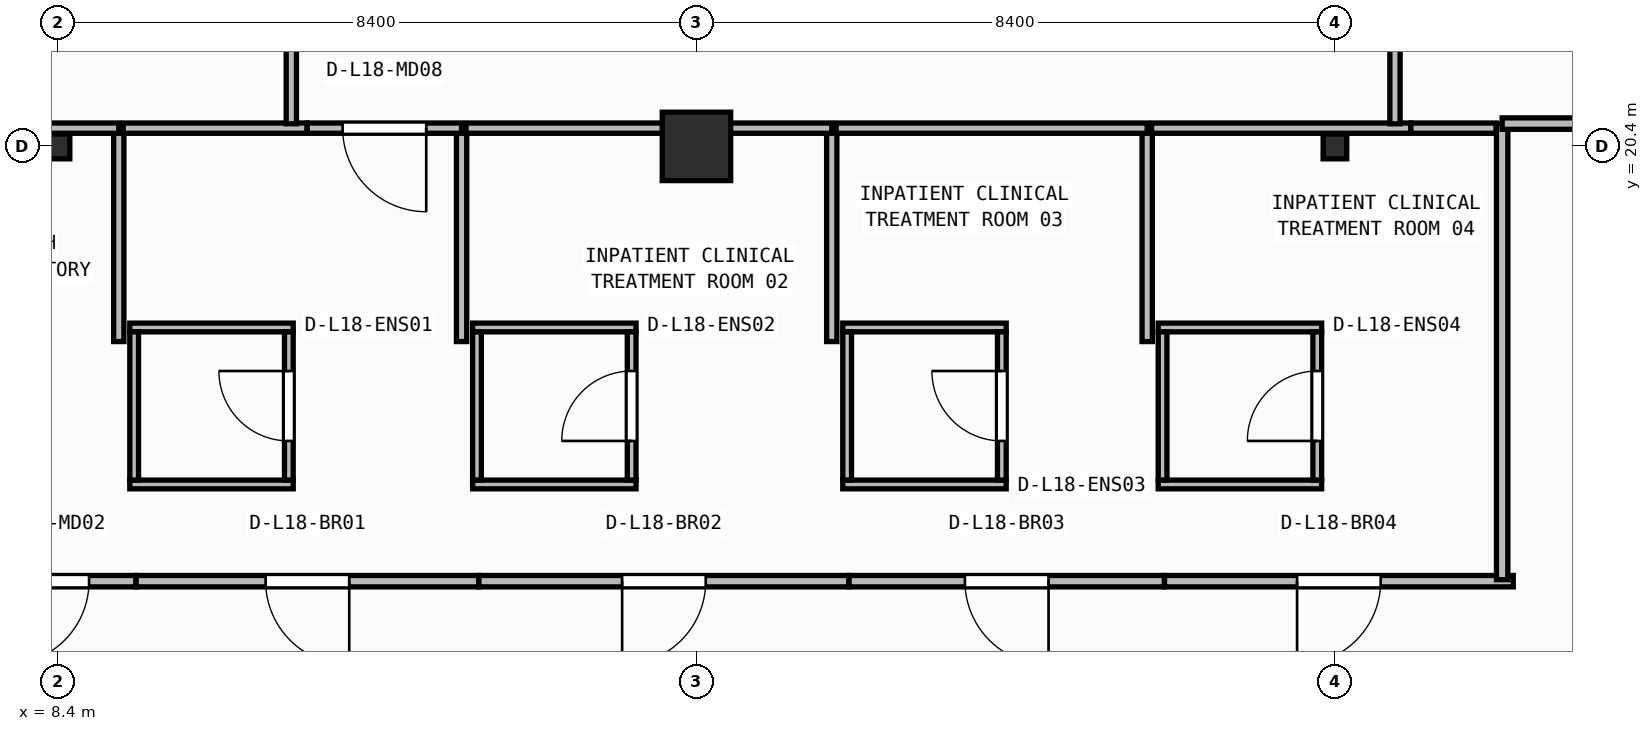
"""IFC4 building model, lengths in metres.
Left out: names, types, materials, properties, quantities, classifications, styles, units other than length and angle.
Written with IfcOpenShell. Run it as: python <this file> out.ifc"""

import sys

from ifc_helpers import new_model, si_unit, direction, frame, frame_2d, origin, origin_2d, place, context, subcontext, project, spatial, rectangle, i_section, extrude, element, fill, save


model = new_model("IFC4")
c1 = context("Model", 3, precision=1e-05, world=origin(), true_north=direction((0.0, 1.0)))
c2 = subcontext(c1, "Body", "Model", "MODEL_VIEW")
j1 = project(units=[si_unit("LENGTHUNIT", "METRE"), si_unit("PLANEANGLEUNIT", "RADIAN")], contexts=[c1])
p1 = place(None, origin())
s1 = spatial("IfcSite", under=j1, at=p1, CompositionType="ELEMENT")
p2 = place(p1, origin())
s2 = spatial("IfcBuilding", under=s1, at=p2, CompositionType="ELEMENT")
p3 = place(p2, frame((0.0, 0.0, 73.85)))
s3 = spatial("IfcBuildingStorey", under=s2, at=p3, CompositionType="ELEMENT", Elevation=73.85)
p4 = place(p3, frame((8.4, 20.4, 0.0), z_axis=(0.0, 0.0, 1.0), x_axis=(1.0, 0.0, 0.0)))
e1 = element("IfcColumn", 1, at=p4, inside=s3, PredefinedType="COLUMN", context=c2, shape_type="SweptSolid", body=[
    extrude(i_section(OverallWidth=0.311, OverallDepth=0.327, WebThickness=0.016, FlangeThickness=0.025, FilletRadius=0.017, at=origin_2d()), origin(), (0.0, 0.0, 1.0), 3.95),
])
p5 = place(p3, frame((16.8, 20.4, 0.0), z_axis=(0.0, 0.0, 1.0), x_axis=(1.0, 0.0, 0.0)))
e2 = element("IfcColumn", 2, at=p5, inside=s3, PredefinedType="COLUMN", context=c2, shape_type="SweptSolid", body=[
    extrude(rectangle(XDim=0.9, YDim=0.9, at=origin_2d()), origin(), (0.0, 0.0, 1.0), 3.95),
])
p6 = place(p3, frame((25.2, 20.4, 0.0), z_axis=(0.0, 0.0, 1.0), x_axis=(1.0, 0.0, 0.0)))
e3 = element("IfcColumn", 3, at=p6, inside=s3, PredefinedType="COLUMN", context=c2, shape_type="SweptSolid", body=[
    extrude(i_section(OverallWidth=0.311, OverallDepth=0.327, WebThickness=0.016, FlangeThickness=0.025, FilletRadius=0.017, at=origin_2d()), origin(), (0.0, 0.0, 1.0), 3.95),
])
for number, where, z_axis, x_axis in (
    (4, (9.345, 15.952, 0.0), (0.0, 0.0, 1.0), (1.0, 0.0, 0.0)),
    (5, (9.345, 18.018, 0.0), (0.0, 0.0, 1.0), (1.0, 0.0, 0.0)),
):
    element("IfcWall", number, at=place(p3, frame(where, z_axis=z_axis, x_axis=x_axis)), inside=s3, PredefinedType="PARTITIONING", context=c2, shape_type="SweptSolid", body=[
        extrude(rectangle(XDim=2.15, YDim=0.115, at=frame_2d((1.075, 0.0))), origin(), (0.0, 0.0, 1.0), 3.71),
    ])
p7 = place(p3, frame((9.403, 16.01, 0.0), z_axis=(0.0, 0.0, 1.0), x_axis=(0.0, 1.0, 0.0)))
e6 = element("IfcWall", 6, at=p7, inside=s3, PredefinedType="PARTITIONING", context=c2, shape_type="SweptSolid", body=[
    extrude(rectangle(XDim=1.95, YDim=0.115, at=frame_2d((0.975, 0.0))), origin(), (0.0, 0.0, 1.0), 3.71),
])
p8 = place(p3, frame((11.438, 16.01, 0.0), z_axis=(0.0, 0.0, 1.0), x_axis=(0.0, 1.0, 0.0)))
e7 = element("IfcWall", 7, at=p8, inside=s3, PredefinedType="PARTITIONING", context=c2, shape_type="SweptSolid", body=[
    extrude(rectangle(XDim=1.95, YDim=0.115, at=frame_2d((0.975, 0.0))), origin(), (0.0, 0.0, 1.0), 3.71),
])
p9 = place(p8, frame((0.515, 0.0, 0.0)))
e8 = element("IfcOpeningElement", 8, at=p9, cuts=e7, PredefinedType="OPENING", context=c2, shape_type="SweptSolid", body=[
    extrude(rectangle(XDim=0.92, YDim=2.1, at=frame_2d((0.46, 1.05))), frame((0.0, 0.067, 0.0), z_axis=(0.0, -1.0, 0.0), x_axis=(1.0, 0.0, 0.0)), (0.0, 0.0, 1.0), 0.135),
])
for number, where, z_axis, x_axis in (
    (9, (13.855, 15.952, 0.0), (0.0, 0.0, 1.0), (1.0, 0.0, 0.0)),
    (10, (13.855, 18.018, 0.0), (0.0, 0.0, 1.0), (1.0, 0.0, 0.0)),
):
    element("IfcWall", number, at=place(p3, frame(where, z_axis=z_axis, x_axis=x_axis)), inside=s3, PredefinedType="PARTITIONING", context=c2, shape_type="SweptSolid", body=[
        extrude(rectangle(XDim=2.15, YDim=0.115, at=frame_2d((1.075, 0.0))), origin(), (0.0, 0.0, 1.0), 3.71),
    ])
p10 = place(p3, frame((13.913, 16.01, 0.0), z_axis=(0.0, 0.0, 1.0), x_axis=(0.0, 1.0, 0.0)))
e11 = element("IfcWall", 11, at=p10, inside=s3, PredefinedType="PARTITIONING", context=c2, shape_type="SweptSolid", body=[
    extrude(rectangle(XDim=1.95, YDim=0.115, at=frame_2d((0.975, 0.0))), origin(), (0.0, 0.0, 1.0), 3.71),
])
p11 = place(p3, frame((15.948, 16.01, 0.0), z_axis=(0.0, 0.0, 1.0), x_axis=(0.0, 1.0, 0.0)))
e12 = element("IfcWall", 12, at=p11, inside=s3, PredefinedType="PARTITIONING", context=c2, shape_type="SweptSolid", body=[
    extrude(rectangle(XDim=1.95, YDim=0.115, at=frame_2d((0.975, 0.0))), origin(), (0.0, 0.0, 1.0), 3.71),
])
p12 = place(p11, frame((0.515, 0.0, 0.0)))
e13 = element("IfcOpeningElement", 13, at=p12, cuts=e12, PredefinedType="OPENING", context=c2, shape_type="SweptSolid", body=[
    extrude(rectangle(XDim=0.92, YDim=2.1, at=frame_2d((0.46, 1.05))), frame((0.0, 0.067, 0.0), z_axis=(0.0, -1.0, 0.0), x_axis=(1.0, 0.0, 0.0)), (0.0, 0.0, 1.0), 0.135),
])
for number, where, z_axis, x_axis in (
    (14, (18.725, 15.952, 0.0), (0.0, 0.0, 1.0), (1.0, 0.0, 0.0)),
    (15, (18.725, 18.018, 0.0), (0.0, 0.0, 1.0), (1.0, 0.0, 0.0)),
):
    element("IfcWall", number, at=place(p3, frame(where, z_axis=z_axis, x_axis=x_axis)), inside=s3, PredefinedType="PARTITIONING", context=c2, shape_type="SweptSolid", body=[
        extrude(rectangle(XDim=2.15, YDim=0.115, at=frame_2d((1.075, 0.0))), origin(), (0.0, 0.0, 1.0), 3.71),
    ])
p13 = place(p3, frame((18.782, 16.01, 0.0), z_axis=(0.0, 0.0, 1.0), x_axis=(0.0, 1.0, 0.0)))
e16 = element("IfcWall", 16, at=p13, inside=s3, PredefinedType="PARTITIONING", context=c2, shape_type="SweptSolid", body=[
    extrude(rectangle(XDim=1.95, YDim=0.115, at=frame_2d((0.975, 0.0))), origin(), (0.0, 0.0, 1.0), 3.71),
])
p14 = place(p3, frame((20.817, 16.01, 0.0), z_axis=(0.0, 0.0, 1.0), x_axis=(0.0, 1.0, 0.0)))
e17 = element("IfcWall", 17, at=p14, inside=s3, PredefinedType="PARTITIONING", context=c2, shape_type="SweptSolid", body=[
    extrude(rectangle(XDim=1.95, YDim=0.115, at=frame_2d((0.975, 0.0))), origin(), (0.0, 0.0, 1.0), 3.71),
])
p15 = place(p14, frame((0.515, 0.0, 0.0)))
e18 = element("IfcOpeningElement", 18, at=p15, cuts=e17, PredefinedType="OPENING", context=c2, shape_type="SweptSolid", body=[
    extrude(rectangle(XDim=0.92, YDim=2.1, at=frame_2d((0.46, 1.05))), frame((0.0, 0.067, 0.0), z_axis=(0.0, -1.0, 0.0), x_axis=(1.0, 0.0, 0.0)), (0.0, 0.0, 1.0), 0.135),
])
for number, where, z_axis, x_axis in (
    (19, (22.875, 15.952, 0.0), (0.0, 0.0, 1.0), (1.0, 0.0, 0.0)),
    (20, (22.875, 18.018, 0.0), (0.0, 0.0, 1.0), (1.0, 0.0, 0.0)),
):
    element("IfcWall", number, at=place(p3, frame(where, z_axis=z_axis, x_axis=x_axis)), inside=s3, PredefinedType="PARTITIONING", context=c2, shape_type="SweptSolid", body=[
        extrude(rectangle(XDim=2.15, YDim=0.115, at=frame_2d((1.075, 0.0))), origin(), (0.0, 0.0, 1.0), 3.71),
    ])
p16 = place(p3, frame((22.933, 16.01, 0.0), z_axis=(0.0, 0.0, 1.0), x_axis=(0.0, 1.0, 0.0)))
e21 = element("IfcWall", 21, at=p16, inside=s3, PredefinedType="PARTITIONING", context=c2, shape_type="SweptSolid", body=[
    extrude(rectangle(XDim=1.95, YDim=0.115, at=frame_2d((0.975, 0.0))), origin(), (0.0, 0.0, 1.0), 3.71),
])
p17 = place(p3, frame((24.968, 16.01, 0.0), z_axis=(0.0, 0.0, 1.0), x_axis=(0.0, 1.0, 0.0)))
e22 = element("IfcWall", 22, at=p17, inside=s3, PredefinedType="PARTITIONING", context=c2, shape_type="SweptSolid", body=[
    extrude(rectangle(XDim=1.95, YDim=0.115, at=frame_2d((0.975, 0.0))), origin(), (0.0, 0.0, 1.0), 3.073),
])
p18 = place(p17, frame((0.515, 0.0, 0.0)))
e23 = element("IfcOpeningElement", 23, at=p18, cuts=e22, PredefinedType="OPENING", context=c2, shape_type="SweptSolid", body=[
    extrude(rectangle(XDim=0.92, YDim=2.1, at=frame_2d((0.46, 1.05))), frame((0.0, 0.067, 0.0), z_axis=(0.0, -1.0, 0.0), x_axis=(1.0, 0.0, 0.0)), (0.0, 0.0, 1.0), 0.135),
])
p19 = place(p3, frame((9.426, 14.68, 0.0), z_axis=(0.0, 0.0, 1.0), x_axis=(-1.0, 0.0, 0.0)))
e24 = element("IfcWall", 24, at=p19, inside=s3, PredefinedType="PARTITIONING", context=c2, shape_type="SweptSolid", body=[
    extrude(rectangle(XDim=2.334, YDim=0.15, at=frame_2d((1.167, 0.0))), origin(), (0.0, 0.0, 1.0), 3.71),
])
p20 = place(p19, frame((0.617, 0.0, 0.0)))
e25 = element("IfcOpeningElement", 25, at=p20, cuts=e24, PredefinedType="OPENING", context=c2, shape_type="SweptSolid", body=[
    extrude(rectangle(XDim=1.1, YDim=2.1, at=frame_2d((0.55, 1.05))), frame((0.0, 0.085, 0.0), z_axis=(0.0, -1.0, 0.0), x_axis=(1.0, 0.0, 0.0)), (0.0, 0.0, 1.0), 0.17),
])
p21 = place(p3, frame((13.936, 14.68, 0.0), z_axis=(0.0, 0.0, 1.0), x_axis=(-1.0, 0.0, 0.0)))
e26 = element("IfcWall", 26, at=p21, inside=s3, PredefinedType="PARTITIONING", context=c2, shape_type="SweptSolid", body=[
    extrude(rectangle(XDim=4.508, YDim=0.15, at=frame_2d((2.254, 0.0))), origin(), (0.0, 0.0, 1.0), 3.71),
])
p22 = place(p21, frame((1.704, 0.0, 0.0)))
e27 = element("IfcOpeningElement", 27, at=p22, cuts=e26, PredefinedType="OPENING", context=c2, shape_type="SweptSolid", body=[
    extrude(rectangle(XDim=1.1, YDim=2.1, at=frame_2d((0.55, 1.05))), frame((0.0, 0.085, 0.0), z_axis=(0.0, -1.0, 0.0), x_axis=(1.0, 0.0, 0.0)), (0.0, 0.0, 1.0), 0.17),
])
p23 = place(p3, frame((18.806, 14.68, 0.0), z_axis=(0.0, 0.0, 1.0), x_axis=(-1.0, 0.0, 0.0)))
e28 = element("IfcWall", 28, at=p23, inside=s3, PredefinedType="PARTITIONING", context=c2, shape_type="SweptSolid", body=[
    extrude(rectangle(XDim=4.868, YDim=0.15, at=frame_2d((2.434, 0.0))), origin(), (0.0, 0.0, 1.0), 3.71),
])
p24 = place(p23, frame((1.884, 0.0, 0.0)))
e29 = element("IfcOpeningElement", 29, at=p24, cuts=e28, PredefinedType="OPENING", context=c2, shape_type="SweptSolid", body=[
    extrude(rectangle(XDim=1.1, YDim=2.1, at=frame_2d((0.55, 1.05))), frame((0.0, 0.085, 0.0), z_axis=(0.0, -1.0, 0.0), x_axis=(1.0, 0.0, 0.0)), (0.0, 0.0, 1.0), 0.17),
])
p25 = place(p3, frame((22.956, 14.68, 0.0), z_axis=(0.0, 0.0, 1.0), x_axis=(-1.0, 0.0, 0.0)))
e30 = element("IfcWall", 30, at=p25, inside=s3, PredefinedType="PARTITIONING", context=c2, shape_type="SweptSolid", body=[
    extrude(rectangle(XDim=4.148, YDim=0.15, at=frame_2d((2.074, 0.0))), origin(), (0.0, 0.0, 1.0), 3.71),
])
p26 = place(p25, frame((1.524, 0.0, 0.0)))
e31 = element("IfcOpeningElement", 31, at=p26, cuts=e30, PredefinedType="OPENING", context=c2, shape_type="SweptSolid", body=[
    extrude(rectangle(XDim=1.1, YDim=2.1, at=frame_2d((0.55, 1.05))), frame((0.0, 0.085, 0.0), z_axis=(0.0, -1.0, 0.0), x_axis=(1.0, 0.0, 0.0)), (0.0, 0.0, 1.0), 0.17),
])
p27 = place(p3, frame((27.546, 14.68, 0.0), z_axis=(0.0, 0.0, 1.0), x_axis=(-1.0, 0.0, 0.0)))
e32 = element("IfcWall", 32, at=p27, inside=s3, PredefinedType="PARTITIONING", context=c2, shape_type="SweptSolid", body=[
    extrude(rectangle(XDim=4.588, YDim=0.15, at=frame_2d((2.294, 0.0))), origin(), (0.0, 0.0, 1.0), 3.71),
])
p28 = place(p27, frame((1.744, 0.0, 0.0)))
e33 = element("IfcOpeningElement", 33, at=p28, cuts=e32, PredefinedType="OPENING", context=c2, shape_type="SweptSolid", body=[
    extrude(rectangle(XDim=1.1, YDim=2.1, at=frame_2d((0.55, 1.05))), frame((0.0, 0.085, 0.0), z_axis=(0.0, -1.0, 0.0), x_axis=(1.0, 0.0, 0.0)), (0.0, 0.0, 1.0), 0.17),
])
p29 = place(p3, frame((27.4, 20.7, 0.0), z_axis=(0.0, 0.0, 1.0), x_axis=(0.0, -1.0, 0.0)))
e34 = element("IfcWall", 34, at=p29, inside=s3, PredefinedType="PARTITIONING", context=c2, shape_type="SweptSolid", body=[
    extrude(rectangle(XDim=6.0, YDim=0.15, at=frame_2d((3.0, 0.0))), origin(), (0.0, 0.0, 1.0), 3.71),
])
p30 = place(p3, frame((29.9, 20.7, 0.0), z_axis=(0.0, 0.0, 1.0), x_axis=(-1.0, 0.0, 0.0)))
e35 = element("IfcWall", 35, at=p30, inside=s3, PredefinedType="PARTITIONING", context=c2, shape_type="SweptSolid", body=[
    extrude(rectangle(XDim=2.5, YDim=0.15, at=frame_2d((1.25, 0.0))), origin(), (0.0, 0.0, 1.0), 3.073),
])
p31 = place(p30, frame((0.225, 0.0, 0.0)))
e36 = element("IfcOpeningElement", 36, at=p31, cuts=e35, PredefinedType="OPENING", context=c2, shape_type="SweptSolid", body=[
    extrude(rectangle(XDim=1.1, YDim=2.1, at=frame_2d((0.55, 1.05))), frame((0.0, 0.085, 0.0), z_axis=(0.0, -1.0, 0.0), x_axis=(1.0, 0.0, 0.0)), (0.0, 0.0, 1.0), 0.17),
])
p32 = place(p3, frame((9.2, 17.833, 0.0), z_axis=(0.0, 0.0, 1.0), x_axis=(0.0, 1.0, 0.0)))
e37 = element("IfcWall", 37, at=p32, inside=s3, PredefinedType="PARTITIONING", context=c2, shape_type="SweptSolid", body=[
    extrude(rectangle(XDim=2.807, YDim=0.135, at=frame_2d((1.404, 0.0))), origin(), (0.0, 0.0, 1.0), 3.71),
])
p33 = place(p3, frame((9.2, 20.64, 0.0), z_axis=(0.0, 0.0, 1.0), x_axis=(-1.0, 0.0, 0.0)))
e38 = element("IfcWall", 38, at=p33, inside=s3, PredefinedType="PARTITIONING", context=c2, shape_type="SweptSolid", body=[
    extrude(rectangle(XDim=4.093, YDim=0.135, at=frame_2d((2.046, 0.0))), origin(), (0.0, 0.0, 1.0), 3.073),
])
p34 = place(p3, frame((13.71, 17.833, 0.0), z_axis=(0.0, 0.0, 1.0), x_axis=(0.0, 1.0, 0.0)))
e39 = element("IfcWall", 39, at=p34, inside=s3, PredefinedType="PARTITIONING", context=c2, shape_type="SweptSolid", body=[
    extrude(rectangle(XDim=2.807, YDim=0.135, at=frame_2d((1.404, 0.0))), origin(), (0.0, 0.0, 1.0), 3.71),
])
p35 = place(p3, frame((11.677, 20.64, 0.0), z_axis=(0.0, 0.0, 1.0), x_axis=(-1.0, 0.0, 0.0)))
e40 = element("IfcWall", 40, at=p35, inside=s3, PredefinedType="PARTITIONING", context=c2, shape_type="SweptSolid", body=[
    extrude(rectangle(XDim=2.42, YDim=0.135, at=frame_2d((1.21, 0.0))), origin(), (0.0, 0.0, 1.0), 3.073),
])
p36 = place(p3, frame((13.71, 20.64, 0.0), z_axis=(0.0, 0.0, 1.0), x_axis=(-1.0, 0.0, 0.0)))
e41 = element("IfcWall", 41, at=p36, inside=s3, PredefinedType="PARTITIONING", context=c2, shape_type="SweptSolid", body=[
    extrude(rectangle(XDim=2.031, YDim=0.135, at=frame_2d((1.015, 0.0))), origin(), (0.0, 0.0, 1.0), 3.073),
])
p37 = place(p36, frame((0.465, 0.0, 0.0)))
e42 = element("IfcOpeningElement", 42, at=p37, cuts=e41, PredefinedType="OPENING", context=c2, shape_type="SweptSolid", body=[
    extrude(rectangle(XDim=1.1, YDim=2.1, at=frame_2d((0.55, 1.05))), frame((0.0, 0.077, 0.0), z_axis=(0.0, -1.0, 0.0), x_axis=(1.0, 0.0, 0.0)), (0.0, 0.0, 1.0), 0.155),
])
p38 = place(p3, frame((18.58, 17.833, 0.0), z_axis=(0.0, 0.0, 1.0), x_axis=(0.0, 1.0, 0.0)))
e43 = element("IfcWall", 43, at=p38, inside=s3, PredefinedType="PARTITIONING", context=c2, shape_type="SweptSolid", body=[
    extrude(rectangle(XDim=2.807, YDim=0.135, at=frame_2d((1.404, 0.0))), origin(), (0.0, 0.0, 1.0), 3.71),
])
p39 = place(p3, frame((18.58, 20.64, 0.0), z_axis=(0.0, 0.0, 1.0), x_axis=(-1.0, 0.0, 0.0)))
e44 = element("IfcWall", 44, at=p39, inside=s3, PredefinedType="PARTITIONING", context=c2, shape_type="SweptSolid", body=[
    extrude(rectangle(XDim=4.812, YDim=0.135, at=frame_2d((2.406, 0.0))), origin(), (0.0, 0.0, 1.0), 3.073),
])
p40 = place(p3, frame((22.73, 17.833, 0.0), z_axis=(0.0, 0.0, 1.0), x_axis=(0.0, 1.0, 0.0)))
e45 = element("IfcWall", 45, at=p40, inside=s3, PredefinedType="PARTITIONING", context=c2, shape_type="SweptSolid", body=[
    extrude(rectangle(XDim=2.807, YDim=0.135, at=frame_2d((1.404, 0.0))), origin(), (0.0, 0.0, 1.0), 3.71),
])
p41 = place(p3, frame((22.73, 20.64, 0.0), z_axis=(0.0, 0.0, 1.0), x_axis=(-1.0, 0.0, 0.0)))
e46 = element("IfcWall", 46, at=p41, inside=s3, PredefinedType="PARTITIONING", context=c2, shape_type="SweptSolid", body=[
    extrude(rectangle(XDim=4.093, YDim=0.135, at=frame_2d((2.046, 0.0))), origin(), (0.0, 0.0, 1.0), 3.073),
])
p42 = place(p3, frame((26.198, 20.64, 0.0), z_axis=(0.0, 0.0, 1.0), x_axis=(-1.0, 0.0, 0.0)))
e47 = element("IfcWall", 47, at=p42, inside=s3, PredefinedType="PARTITIONING", context=c2, shape_type="SweptSolid", body=[
    extrude(rectangle(XDim=3.41, YDim=0.135, at=frame_2d((1.705, 0.0))), origin(), (0.0, 0.0, 1.0), 3.073),
])
p43 = place(p3, frame((27.32, 20.64, 0.0), z_axis=(0.0, 0.0, 1.0), x_axis=(-1.0, 0.0, 0.0)))
e48 = element("IfcWall", 48, at=p43, inside=s3, PredefinedType="PARTITIONING", context=c2, shape_type="SweptSolid", body=[
    extrude(rectangle(XDim=1.121, YDim=0.135, at=frame_2d((0.56, 0.0))), origin(), (0.0, 0.0, 1.0), 3.073),
])
p44 = place(p3, frame((11.47, 20.698, 0.0), z_axis=(0.0, 0.0, 1.0), x_axis=(0.0, 1.0, 0.0)))
e49 = element("IfcWall", 49, at=p44, inside=s3, PredefinedType="PARTITIONING", context=c2, shape_type="SweptSolid", body=[
    extrude(rectangle(XDim=16.881, YDim=0.135, at=frame_2d((8.44, 0.0))), origin(), (0.0, 0.0, 1.0), 3.71),
])
p45 = place(p3, frame((25.99, 20.698, 0.0), z_axis=(0.0, 0.0, 1.0), x_axis=(0.0, 1.0, 0.0)))
e50 = element("IfcWall", 50, at=p45, inside=s3, PredefinedType="PARTITIONING", context=c2, shape_type="SweptSolid", body=[
    extrude(rectangle(XDim=10.779, YDim=0.135, at=frame_2d((5.39, 0.0))), origin(), (0.0, 0.0, 1.0), 3.71),
])
p46 = place(p9, origin())
e51 = element("IfcDoor", 51, at=p46, inside=s3, OperationType="SINGLE_SWING_RIGHT", PredefinedType="DOOR", context=c2, shape_type="SweptSolid", body=[
    extrude(rectangle(XDim=0.92, YDim=2.1, at=frame_2d((0.46, 1.05))), frame((0.0, 0.025, 0.0), z_axis=(0.0, -1.0, 0.0), x_axis=(1.0, 0.0, 0.0)), (0.0, 0.0, 1.0), 0.05),
])
fill(e8, e51)
p47 = place(p12, origin())
e52 = element("IfcDoor", 52, at=p47, inside=s3, OperationType="SINGLE_SWING_LEFT", PredefinedType="DOOR", context=c2, shape_type="SweptSolid", body=[
    extrude(rectangle(XDim=0.92, YDim=2.1, at=frame_2d((0.46, 1.05))), frame((0.0, 0.025, 0.0), z_axis=(0.0, -1.0, 0.0), x_axis=(1.0, 0.0, 0.0)), (0.0, 0.0, 1.0), 0.05),
])
fill(e13, e52)
p48 = place(p15, origin())
e53 = element("IfcDoor", 53, at=p48, inside=s3, OperationType="SINGLE_SWING_RIGHT", PredefinedType="DOOR", context=c2, shape_type="SweptSolid", body=[
    extrude(rectangle(XDim=0.92, YDim=2.1, at=frame_2d((0.46, 1.05))), frame((0.0, 0.025, 0.0), z_axis=(0.0, -1.0, 0.0), x_axis=(1.0, 0.0, 0.0)), (0.0, 0.0, 1.0), 0.05),
])
fill(e18, e53)
p49 = place(p18, origin())
e54 = element("IfcDoor", 54, at=p49, inside=s3, OperationType="SINGLE_SWING_LEFT", PredefinedType="DOOR", context=c2, shape_type="SweptSolid", body=[
    extrude(rectangle(XDim=0.92, YDim=2.1, at=frame_2d((0.46, 1.05))), frame((0.0, 0.025, 0.0), z_axis=(0.0, -1.0, 0.0), x_axis=(1.0, 0.0, 0.0)), (0.0, 0.0, 1.0), 0.05),
])
fill(e23, e54)
p50 = place(p20, origin())
e55 = element("IfcDoor", 55, at=p50, inside=s3, OperationType="SINGLE_SWING_RIGHT", PredefinedType="DOOR", context=c2, shape_type="SweptSolid", body=[
    extrude(rectangle(XDim=1.1, YDim=2.1, at=frame_2d((0.55, 1.05))), frame((0.0, 0.025, 0.0), z_axis=(0.0, -1.0, 0.0), x_axis=(1.0, 0.0, 0.0)), (0.0, 0.0, 1.0), 0.05),
])
fill(e25, e55)
p51 = place(p22, origin())
e56 = element("IfcDoor", 56, at=p51, inside=s3, OperationType="SINGLE_SWING_LEFT", PredefinedType="DOOR", context=c2, shape_type="SweptSolid", body=[
    extrude(rectangle(XDim=1.1, YDim=2.1, at=frame_2d((0.55, 1.05))), frame((0.0, 0.025, 0.0), z_axis=(0.0, -1.0, 0.0), x_axis=(1.0, 0.0, 0.0)), (0.0, 0.0, 1.0), 0.05),
])
fill(e27, e56)
p52 = place(p24, origin())
e57 = element("IfcDoor", 57, at=p52, inside=s3, OperationType="SINGLE_SWING_RIGHT", PredefinedType="DOOR", context=c2, shape_type="SweptSolid", body=[
    extrude(rectangle(XDim=1.1, YDim=2.1, at=frame_2d((0.55, 1.05))), frame((0.0, 0.025, 0.0), z_axis=(0.0, -1.0, 0.0), x_axis=(1.0, 0.0, 0.0)), (0.0, 0.0, 1.0), 0.05),
])
fill(e29, e57)
p53 = place(p26, origin())
e58 = element("IfcDoor", 58, at=p53, inside=s3, OperationType="SINGLE_SWING_LEFT", PredefinedType="DOOR", context=c2, shape_type="SweptSolid", body=[
    extrude(rectangle(XDim=1.1, YDim=2.1, at=frame_2d((0.55, 1.05))), frame((0.0, 0.025, 0.0), z_axis=(0.0, -1.0, 0.0), x_axis=(1.0, 0.0, 0.0)), (0.0, 0.0, 1.0), 0.05),
])
fill(e31, e58)
p54 = place(p28, origin())
e59 = element("IfcDoor", 59, at=p54, inside=s3, OperationType="SINGLE_SWING_RIGHT", PredefinedType="DOOR", context=c2, shape_type="SweptSolid", body=[
    extrude(rectangle(XDim=1.1, YDim=2.1, at=frame_2d((0.55, 1.05))), frame((0.0, 0.025, 0.0), z_axis=(0.0, -1.0, 0.0), x_axis=(1.0, 0.0, 0.0)), (0.0, 0.0, 1.0), 0.05),
])
fill(e33, e59)
p55 = place(p37, origin())
e60 = element("IfcDoor", 60, at=p55, inside=s3, OperationType="SINGLE_SWING_LEFT", PredefinedType="DOOR", context=c2, shape_type="SweptSolid", body=[
    extrude(rectangle(XDim=1.1, YDim=2.1, at=frame_2d((0.55, 1.05))), frame((0.0, 0.025, 0.0), z_axis=(0.0, -1.0, 0.0), x_axis=(1.0, 0.0, 0.0)), (0.0, 0.0, 1.0), 0.05),
])
fill(e42, e60)
save(model, sys.argv[1])
